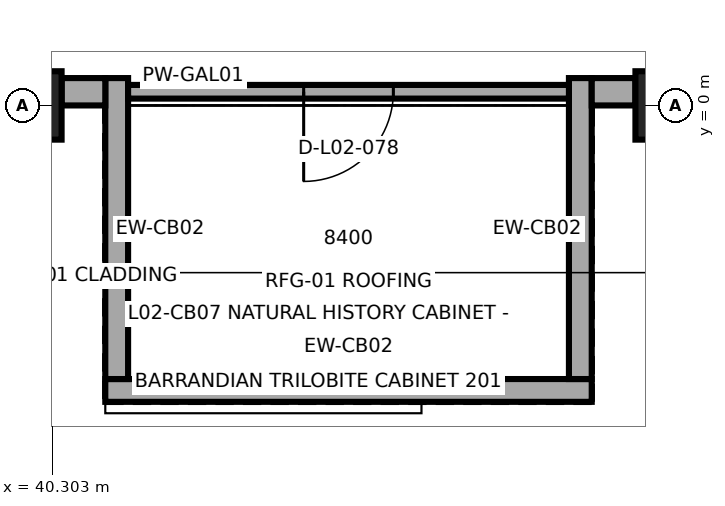
"""IFC4 building model, lengths in metres.
Left out: names, types, materials, properties, quantities, classifications, styles, units other than length and angle.
Written with IfcOpenShell. Run it as: python <this file> out.ifc"""

import sys

from ifc_helpers import new_model, si_unit, direction, frame, frame_2d, origin, origin_2d, place, context, subcontext, project, spatial, rectangle, extrude, element, fill, save


model = new_model("IFC4")
c1 = context("Model", 3, precision=1e-05, world=origin(), true_north=direction((0.0, 1.0)))
c2 = subcontext(c1, "Body", "Model", "MODEL_VIEW")
j1 = project(units=[si_unit("LENGTHUNIT", "METRE"), si_unit("PLANEANGLEUNIT", "RADIAN")], contexts=[c1])
p1 = place(None, origin())
s1 = spatial("IfcSite", under=j1, at=p1, CompositionType="ELEMENT")
p2 = place(p1, origin())
s2 = spatial("IfcBuilding", under=s1, at=p2, CompositionType="ELEMENT")
p3 = place(p2, frame((0.0, 0.0, 12.9)))
s3 = spatial("IfcBuildingStorey", under=s2, at=p3, CompositionType="ELEMENT", Elevation=12.9)
for number, where, z_axis, x_axis in (
    (1, (40.0, 0.0, 0.0), (0.0, 0.0, 1.0), (1.0, 0.0, 0.0)),
    (2, (48.4, 0.0, 0.0), (0.0, 0.0, 1.0), (1.0, 0.0, 0.0)),
):
    element("IfcColumn", number, at=place(p3, frame(where, z_axis=z_axis, x_axis=x_axis)), inside=s3, PredefinedType="COLUMN", context=c2, shape_type="SweptSolid", body=[
        extrude(rectangle(XDim=0.85, YDim=0.9, at=origin_2d()), origin(), (0.0, 0.0, 1.0), 4.5),
    ])
p4 = place(p3, frame((41.0, -3.75, 0.0), z_axis=(0.0, 0.0, 1.0), x_axis=(1.0, 0.0, 0.0)))
e3 = element("IfcWall", 3, at=p4, inside=s3, PredefinedType="SOLIDWALL", context=c2, shape_type="SweptSolid", body=[
    extrude(rectangle(XDim=6.4, YDim=0.3, at=frame_2d((3.2, 0.0))), origin(), (0.0, 0.0, 1.0), 2.99),
])
for number, where, z_axis, x_axis in (
    (4, (41.15, 0.36, 0.0), (0.0, 0.0, 1.0), (0.0, -1.0, 0.0)),
    (5, (47.25, -3.6, 0.0), (0.0, 0.0, 1.0), (0.0, 1.0, 0.0)),
):
    element("IfcWall", number, at=place(p3, frame(where, z_axis=z_axis, x_axis=x_axis)), inside=s3, PredefinedType="SOLIDWALL", context=c2, shape_type="SweptSolid", body=[
        extrude(rectangle(XDim=3.96, YDim=0.3, at=frame_2d((1.98, 0.0))), origin(), (0.0, 0.0, 1.0), 2.99),
    ])
p5 = place(p3, frame((40.425, 0.18, 0.0), z_axis=(0.0, 0.0, 1.0), x_axis=(1.0, 0.0, 0.0)))
e6 = element("IfcWall", 6, at=p5, inside=s3, PredefinedType="SOLIDWALL", context=c2, shape_type="SweptSolid", body=[
    extrude(rectangle(XDim=0.575, YDim=0.36, at=frame_2d((0.288, 0.0))), origin(), (0.0, 0.0, 1.0), 3.335),
])
p6 = place(p3, frame((47.4, 0.18, 0.0), z_axis=(0.0, 0.0, 1.0), x_axis=(1.0, 0.0, 0.0)))
e7 = element("IfcWall", 7, at=p6, inside=s3, PredefinedType="SOLIDWALL", context=c2, shape_type="SweptSolid", body=[
    extrude(rectangle(XDim=0.575, YDim=0.36, at=frame_2d((0.288, 0.0))), origin(), (0.0, 0.0, 1.0), 3.335),
])
p7 = place(p3, frame((41.3, 0.18, 0.0), z_axis=(0.0, 0.0, 1.0), x_axis=(1.0, 0.0, 0.0)))
e8 = element("IfcWall", 8, at=p7, inside=s3, PredefinedType="PARTITIONING", context=c2, shape_type="SweptSolid", body=[
    extrude(rectangle(XDim=5.8, YDim=0.18, at=frame_2d((2.9, 0.0))), origin(), (0.0, 0.0, 1.0), 2.99),
])
p8 = place(p7, frame((2.31, 0.0, 0.0)))
e9 = element("IfcOpeningElement", 9, at=p8, cuts=e8, PredefinedType="OPENING", context=c2, shape_type="SweptSolid", body=[
    extrude(rectangle(XDim=1.18, YDim=2.25, at=frame_2d((0.59, 1.125))), frame((0.0, 0.1, 0.0), z_axis=(0.0, -1.0, 0.0), x_axis=(1.0, 0.0, 0.0)), (0.0, 0.0, 1.0), 0.2),
])
p9 = place(p8, origin())
e10 = element("IfcDoor", 10, at=p9, inside=s3, OperationType="SINGLE_SWING_RIGHT", PredefinedType="DOOR", context=c2, shape_type="SweptSolid", body=[
    extrude(rectangle(XDim=1.18, YDim=2.25, at=frame_2d((0.59, 1.125))), frame((0.0, 0.025, 0.0), z_axis=(0.0, -1.0, 0.0), x_axis=(1.0, 0.0, 0.0)), (0.0, 0.0, 1.0), 0.05),
])
fill(e9, e10)
save(model, sys.argv[1])
